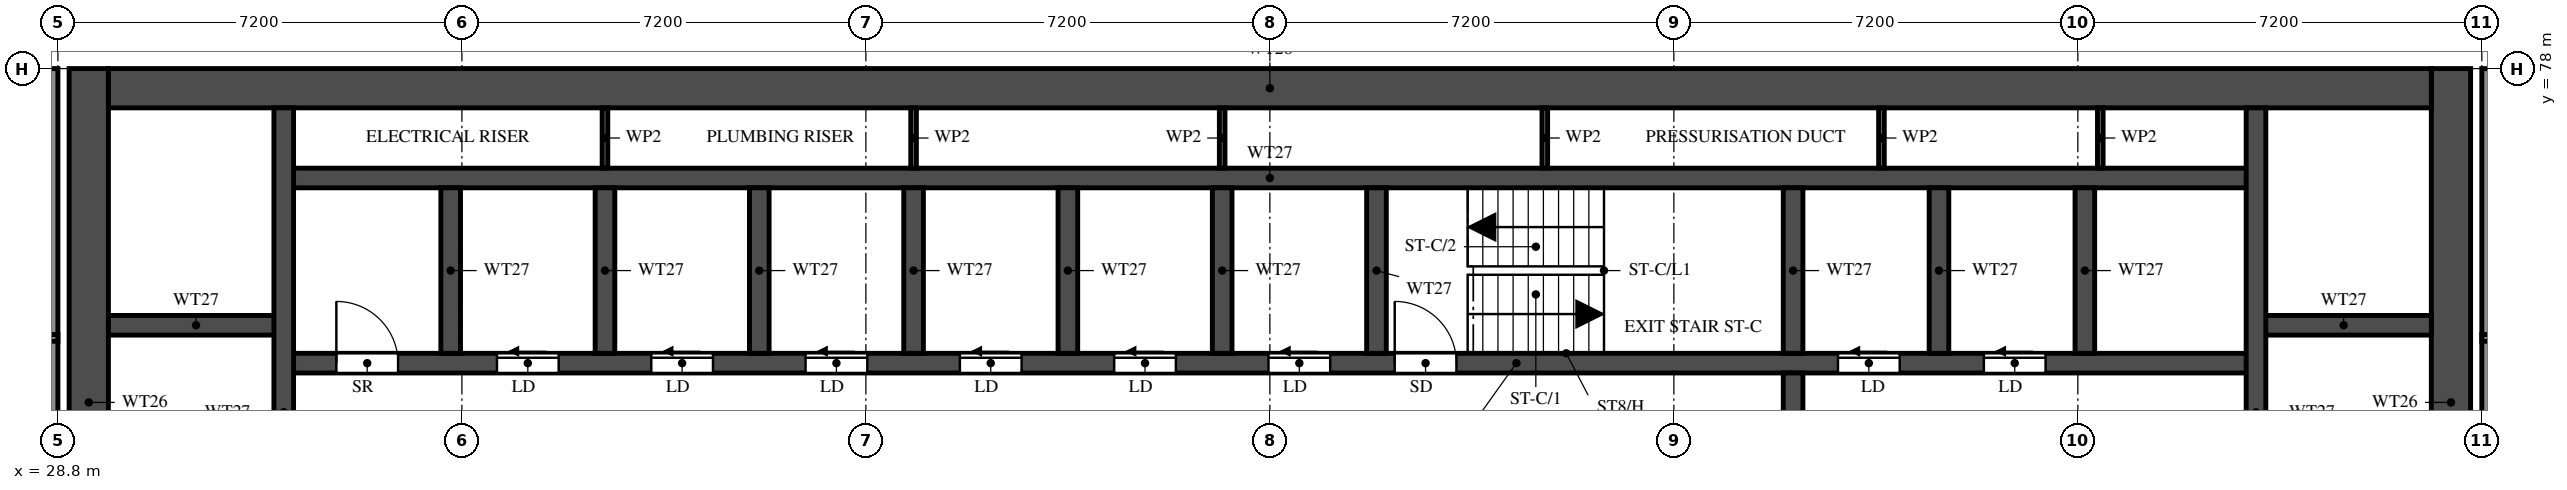
"""IFC4 building model, lengths in metres.
Left out: names, types, materials, properties, quantities, classifications, styles, units other than length and angle.
Written with IfcOpenShell. Run it as: python <this file> out.ifc"""

import sys

from ifc_helpers import new_model, si_unit, direction, frame, frame_2d, origin, place, context, subcontext, project, spatial, rectangle, extrude, element, fill, save


model = new_model("IFC4")
c1 = context("Model", 3, precision=1e-05, world=origin(), true_north=direction((0.0, 1.0)))
c2 = subcontext(c1, "Body", "Model", "MODEL_VIEW")
j1 = project(units=[si_unit("LENGTHUNIT", "METRE"), si_unit("PLANEANGLEUNIT", "RADIAN")], contexts=[c1])
p1 = place(None, origin())
s1 = spatial("IfcSite", under=j1, at=p1, CompositionType="ELEMENT")
p2 = place(p1, origin())
s2 = spatial("IfcBuilding", under=s1, at=p2, CompositionType="ELEMENT")
p3 = place(p2, frame((0.0, 0.0, 199.0)))
s3 = spatial("IfcBuildingStorey", under=s2, at=p3, CompositionType="ELEMENT", Elevation=199.0)
for number, where, z_axis, x_axis in (
    (1, (29.35, 66.1, 0.0), (0.0, 0.0, 1.0), (0.0, 1.0, 0.0)),
    (2, (71.45, 66.1, 0.0), (0.0, 0.0, 1.0), (0.0, 1.0, 0.0)),
):
    element("IfcWall", number, at=place(p3, frame(where, z_axis=z_axis, x_axis=x_axis)), inside=s3, PredefinedType="SHEAR", context=c2, shape_type="SweptSolid", body=[
        extrude(rectangle(XDim=11.9, YDim=0.7, at=frame_2d((5.95, 0.0))), origin(), (0.0, 0.0, 1.0), 3.2),
    ])
p4 = place(p3, frame((29.7, 77.65, 0.0), z_axis=(0.0, 0.0, 1.0), x_axis=(1.0, 0.0, 0.0)))
e3 = element("IfcWall", 3, at=p4, inside=s3, PredefinedType="SHEAR", context=c2, shape_type="SweptSolid", body=[
    extrude(rectangle(XDim=41.4, YDim=0.7, at=frame_2d((20.7, 0.0))), origin(), (0.0, 0.0, 1.0), 3.2),
])
p5 = place(p3, frame((32.825, 72.75, 0.0), z_axis=(0.0, 0.0, 1.0), x_axis=(1.0, 0.0, 0.0)))
e4 = element("IfcWall", 4, at=p5, inside=s3, PredefinedType="SHEAR", context=c2, shape_type="SweptSolid", body=[
    extrude(rectangle(XDim=35.15, YDim=0.35, at=frame_2d((17.575, 0.0))), origin(), (0.0, 0.0, 1.0), 3.2),
])
p6 = place(p5, frame((19.8, 0.0, 0.0)))
e5 = element("IfcOpeningElement", 5, at=p6, cuts=e4, PredefinedType="OPENING", context=c2, shape_type="SweptSolid", body=[
    extrude(rectangle(XDim=1.1, YDim=2.1, at=frame_2d((0.55, 1.05))), frame((0.0, 0.185, 0.0), z_axis=(0.0, -1.0, 0.0), x_axis=(1.0, 0.0, 0.0)), (0.0, 0.0, 1.0), 0.37),
])
p7 = place(p5, frame((27.7, 0.0, 0.0)))
e6 = element("IfcOpeningElement", 6, at=p7, cuts=e4, PredefinedType="OPENING", context=c2, shape_type="SweptSolid", body=[
    extrude(rectangle(XDim=1.1, YDim=2.1, at=frame_2d((0.55, 1.05))), frame((0.0, 0.185, 0.0), z_axis=(0.0, -1.0, 0.0), x_axis=(1.0, 0.0, 0.0)), (0.0, 0.0, 1.0), 0.37),
])
p8 = place(p5, frame((30.3, 0.0, 0.0)))
e7 = element("IfcOpeningElement", 7, at=p8, cuts=e4, PredefinedType="OPENING", context=c2, shape_type="SweptSolid", body=[
    extrude(rectangle(XDim=1.1, YDim=2.1, at=frame_2d((0.55, 1.05))), frame((0.0, 0.185, 0.0), z_axis=(0.0, -1.0, 0.0), x_axis=(1.0, 0.0, 0.0)), (0.0, 0.0, 1.0), 0.37),
])
p9 = place(p5, frame((3.8, 0.0, 0.0)))
e8 = element("IfcOpeningElement", 8, at=p9, cuts=e4, PredefinedType="OPENING", context=c2, shape_type="SweptSolid", body=[
    extrude(rectangle(XDim=1.1, YDim=2.1, at=frame_2d((0.55, 1.05))), frame((0.0, 0.185, 0.0), z_axis=(0.0, -1.0, 0.0), x_axis=(1.0, 0.0, 0.0)), (0.0, 0.0, 1.0), 0.37),
])
p10 = place(p5, frame((6.55, 0.0, 0.0)))
e9 = element("IfcOpeningElement", 9, at=p10, cuts=e4, PredefinedType="OPENING", context=c2, shape_type="SweptSolid", body=[
    extrude(rectangle(XDim=1.1, YDim=2.1, at=frame_2d((0.55, 1.05))), frame((0.0, 0.185, 0.0), z_axis=(0.0, -1.0, 0.0), x_axis=(1.0, 0.0, 0.0)), (0.0, 0.0, 1.0), 0.37),
])
p11 = place(p5, frame((9.3, 0.0, 0.0)))
e10 = element("IfcOpeningElement", 10, at=p11, cuts=e4, PredefinedType="OPENING", context=c2, shape_type="SweptSolid", body=[
    extrude(rectangle(XDim=1.1, YDim=2.1, at=frame_2d((0.55, 1.05))), frame((0.0, 0.185, 0.0), z_axis=(0.0, -1.0, 0.0), x_axis=(1.0, 0.0, 0.0)), (0.0, 0.0, 1.0), 0.37),
])
p12 = place(p5, frame((12.05, 0.0, 0.0)))
e11 = element("IfcOpeningElement", 11, at=p12, cuts=e4, PredefinedType="OPENING", context=c2, shape_type="SweptSolid", body=[
    extrude(rectangle(XDim=1.1, YDim=2.1, at=frame_2d((0.55, 1.05))), frame((0.0, 0.185, 0.0), z_axis=(0.0, -1.0, 0.0), x_axis=(1.0, 0.0, 0.0)), (0.0, 0.0, 1.0), 0.37),
])
p13 = place(p5, frame((14.8, 0.0, 0.0)))
e12 = element("IfcOpeningElement", 12, at=p13, cuts=e4, PredefinedType="OPENING", context=c2, shape_type="SweptSolid", body=[
    extrude(rectangle(XDim=1.1, YDim=2.1, at=frame_2d((0.55, 1.05))), frame((0.0, 0.185, 0.0), z_axis=(0.0, -1.0, 0.0), x_axis=(1.0, 0.0, 0.0)), (0.0, 0.0, 1.0), 0.37),
])
p14 = place(p5, frame((17.55, 0.0, 0.0)))
e13 = element("IfcOpeningElement", 13, at=p14, cuts=e4, PredefinedType="OPENING", context=c2, shape_type="SweptSolid", body=[
    extrude(rectangle(XDim=1.1, YDim=2.1, at=frame_2d((0.55, 1.05))), frame((0.0, 0.185, 0.0), z_axis=(0.0, -1.0, 0.0), x_axis=(1.0, 0.0, 0.0)), (0.0, 0.0, 1.0), 0.37),
])
p15 = place(p5, frame((0.938, 0.0, 0.0)))
e14 = element("IfcOpeningElement", 14, at=p15, cuts=e4, PredefinedType="OPENING", context=c2, shape_type="SweptSolid", body=[
    extrude(rectangle(XDim=1.1, YDim=2.1, at=frame_2d((0.55, 1.05))), frame((0.0, 0.185, 0.0), z_axis=(0.0, -1.0, 0.0), x_axis=(1.0, 0.0, 0.0)), (0.0, 0.0, 1.0), 0.37),
])
p16 = place(p3, frame((32.825, 76.05, 0.0), z_axis=(0.0, 0.0, 1.0), x_axis=(1.0, 0.0, 0.0)))
e15 = element("IfcWall", 15, at=p16, inside=s3, PredefinedType="SHEAR", context=c2, shape_type="SweptSolid", body=[
    extrude(rectangle(XDim=35.15, YDim=0.35, at=frame_2d((17.575, 0.0))), origin(), (0.0, 0.0, 1.0), 3.2),
])
for number, where, z_axis, x_axis in (
    (16, (29.7, 73.425, 0.0), (0.0, 0.0, 1.0), (1.0, 0.0, 0.0)),
    (17, (67.975, 73.425, 0.0), (0.0, 0.0, 1.0), (1.0, 0.0, 0.0)),
):
    element("IfcWall", number, at=place(p3, frame(where, z_axis=z_axis, x_axis=x_axis)), inside=s3, PredefinedType="SHEAR", context=c2, shape_type="SweptSolid", body=[
        extrude(rectangle(XDim=3.125, YDim=0.35, at=frame_2d((1.562, 0.0))), origin(), (0.0, 0.0, 1.0), 3.2),
    ])
p17 = place(p3, frame((32.825, 66.45, 0.0), z_axis=(0.0, 0.0, 1.0), x_axis=(0.0, 1.0, 0.0)))
e18 = element("IfcWall", 18, at=p17, inside=s3, PredefinedType="SHEAR", context=c2, shape_type="SweptSolid", body=[
    extrude(rectangle(XDim=10.85, YDim=0.35, at=frame_2d((5.425, 0.0))), origin(), (0.0, 0.0, 1.0), 3.2),
])
p18 = place(p3, frame((67.975, 66.45, 0.0), z_axis=(0.0, 0.0, 1.0), x_axis=(0.0, 1.0, 0.0)))
e19 = element("IfcWall", 19, at=p18, inside=s3, PredefinedType="SHEAR", context=c2, shape_type="SweptSolid", body=[
    extrude(rectangle(XDim=10.85, YDim=0.35, at=frame_2d((5.425, 0.0))), origin(), (0.0, 0.0, 1.0), 3.2),
])
p19 = place(p18, frame((0.15, 0.0, 0.0)))
e20 = element("IfcOpeningElement", 20, at=p19, cuts=e19, PredefinedType="OPENING", context=c2, shape_type="SweptSolid", body=[
    extrude(rectangle(XDim=1.1, YDim=2.1, at=frame_2d((0.55, 1.05))), frame((0.0, 0.185, 0.0), z_axis=(0.0, -1.0, 0.0), x_axis=(1.0, 0.0, 0.0)), (0.0, 0.0, 1.0), 0.37),
])
p20 = place(p3, frame((59.725, 66.45, 0.0), z_axis=(0.0, 0.0, 1.0), x_axis=(0.0, 1.0, 0.0)))
e21 = element("IfcWall", 21, at=p20, inside=s3, PredefinedType="SHEAR", context=c2, shape_type="SweptSolid", body=[
    extrude(rectangle(XDim=6.125, YDim=0.35, at=frame_2d((3.062, 0.0))), origin(), (0.0, 0.0, 1.0), 3.2),
])
p21 = place(p20, frame((3.85, 0.0, 0.0)))
e22 = element("IfcOpeningElement", 22, at=p21, cuts=e21, PredefinedType="OPENING", context=c2, shape_type="SweptSolid", body=[
    extrude(rectangle(XDim=1.2, YDim=2.1, at=frame_2d((0.6, 1.05))), frame((0.0, 0.185, 0.0), z_axis=(0.0, -1.0, 0.0), x_axis=(1.0, 0.0, 0.0)), (0.0, 0.0, 1.0), 0.37),
])
for number, where, z_axis, x_axis in (
    (23, (59.725, 72.925, 0.0), (0.0, 0.0, 1.0), (0.0, 1.0, 0.0)),
    (24, (35.8, 72.925, 0.0), (0.0, 0.0, 1.0), (0.0, 1.0, 0.0)),
    (25, (38.55, 72.925, 0.0), (0.0, 0.0, 1.0), (0.0, 1.0, 0.0)),
    (26, (41.3, 72.925, 0.0), (0.0, 0.0, 1.0), (0.0, 1.0, 0.0)),
    (27, (44.05, 72.925, 0.0), (0.0, 0.0, 1.0), (0.0, 1.0, 0.0)),
    (28, (46.8, 72.925, 0.0), (0.0, 0.0, 1.0), (0.0, 1.0, 0.0)),
    (29, (49.55, 72.925, 0.0), (0.0, 0.0, 1.0), (0.0, 1.0, 0.0)),
    (30, (52.3, 72.925, 0.0), (0.0, 0.0, 1.0), (0.0, 1.0, 0.0)),
    (31, (62.325, 72.925, 0.0), (0.0, 0.0, 1.0), (0.0, 1.0, 0.0)),
    (32, (64.925, 72.925, 0.0), (0.0, 0.0, 1.0), (0.0, 1.0, 0.0)),
):
    element("IfcWall", number, at=place(p3, frame(where, z_axis=z_axis, x_axis=x_axis)), inside=s3, PredefinedType="SHEAR", context=c2, shape_type="SweptSolid", body=[
        extrude(rectangle(XDim=2.95, YDim=0.35, at=frame_2d((1.475, 0.0))), origin(), (0.0, 0.0, 1.0), 3.2),
    ])
for number, where, z_axis, x_axis in (
    (33, (38.55, 76.225, 0.0), (0.0, 0.0, 1.0), (0.0, 1.0, 0.0)),
    (34, (44.05, 76.225, 0.0), (0.0, 0.0, 1.0), (0.0, 1.0, 0.0)),
    (35, (49.55, 76.225, 0.0), (0.0, 0.0, 1.0), (0.0, 1.0, 0.0)),
    (36, (55.3, 76.225, 0.0), (0.0, 0.0, 1.0), (0.0, 1.0, 0.0)),
    (37, (61.3, 76.225, 0.0), (0.0, 0.0, 1.0), (0.0, 1.0, 0.0)),
    (38, (65.2, 76.225, 0.0), (0.0, 0.0, 1.0), (0.0, 1.0, 0.0)),
):
    element("IfcWall", number, at=place(p3, frame(where, z_axis=z_axis, x_axis=x_axis)), inside=s3, PredefinedType="PARTITIONING", context=c2, shape_type="SweptSolid", body=[
        extrude(rectangle(XDim=1.075, YDim=0.1, at=frame_2d((0.538, 0.0))), origin(), (0.0, 0.0, 1.0), 3.2),
    ])
for number, where, z_axis, x_axis in (
    (39, (28.7, 62.4, 0.0), (0.0, 0.0, 1.0), (0.0, 1.0, 0.0)),
    (40, (72.1, 62.4, 0.0), (0.0, 0.0, 1.0), (0.0, 1.0, 0.0)),
):
    element("IfcWall", number, at=place(p3, frame(where, z_axis=z_axis, x_axis=x_axis)), inside=s3, PredefinedType="SOLIDWALL", context=c2, shape_type="SweptSolid", body=[
        extrude(rectangle(XDim=15.6, YDim=0.2, at=frame_2d((7.8, 0.0))), origin(), (0.0, 0.0, 1.0), 3.2),
    ])
p22 = place(p3, frame((14.525, 73.2, 0.0), z_axis=(0.0, 0.0, 1.0), x_axis=(1.0, 0.0, 0.0)))
e41 = element("IfcWall", 41, at=p22, inside=s3, PredefinedType="PARTITIONING", context=c2, shape_type="SweptSolid", body=[
    extrude(rectangle(XDim=14.275, YDim=0.12, at=frame_2d((7.138, 0.0))), origin(), (0.0, 0.0, 1.0), 2.3),
])
p23 = place(p22, frame((7.675, 0.0, 0.0)))
e42 = element("IfcOpeningElement", 42, at=p23, cuts=e41, PredefinedType="OPENING", context=c2, shape_type="SweptSolid", body=[
    extrude(rectangle(XDim=0.9, YDim=2.1, at=frame_2d((0.45, 1.05))), frame((0.0, 0.07, 0.0), z_axis=(0.0, -1.0, 0.0), x_axis=(1.0, 0.0, 0.0)), (0.0, 0.0, 1.0), 0.14),
])
p24 = place(p3, frame((72.0, 73.2, 0.0), z_axis=(0.0, 0.0, 1.0), x_axis=(1.0, 0.0, 0.0)))
e43 = element("IfcWall", 43, at=p24, inside=s3, PredefinedType="PARTITIONING", context=c2, shape_type="SweptSolid", body=[
    extrude(rectangle(XDim=14.275, YDim=0.12, at=frame_2d((7.137, 0.0))), origin(), (0.0, 0.0, 1.0), 2.3),
])
p25 = place(p24, frame((5.7, 0.0, 0.0)))
e44 = element("IfcOpeningElement", 44, at=p25, cuts=e43, PredefinedType="OPENING", context=c2, shape_type="SweptSolid", body=[
    extrude(rectangle(XDim=0.9, YDim=2.1, at=frame_2d((0.45, 1.05))), frame((0.0, 0.07, 0.0), z_axis=(0.0, -1.0, 0.0), x_axis=(1.0, 0.0, 0.0)), (0.0, 0.0, 1.0), 0.14),
])
p26 = place(p6, origin())
e45 = element("IfcDoor", 45, at=p26, inside=s3, OperationType="SINGLE_SWING_LEFT", PredefinedType="DOOR", context=c2, shape_type="SweptSolid", body=[
    extrude(rectangle(XDim=1.1, YDim=2.1, at=frame_2d((0.55, 1.05))), frame((0.0, 0.025, 0.0), z_axis=(0.0, -1.0, 0.0), x_axis=(1.0, 0.0, 0.0)), (0.0, 0.0, 1.0), 0.05),
])
fill(e5, e45)
p27 = place(p7, origin())
e46 = element("IfcDoor", 46, at=p27, inside=s3, OperationType="SLIDING_TO_LEFT", PredefinedType="DOOR", context=c2, shape_type="SweptSolid", body=[
    extrude(rectangle(XDim=1.1, YDim=2.1, at=frame_2d((0.55, 1.05))), frame((0.0, 0.025, 0.0), z_axis=(0.0, -1.0, 0.0), x_axis=(1.0, 0.0, 0.0)), (0.0, 0.0, 1.0), 0.05),
])
fill(e6, e46)
p28 = place(p8, origin())
e47 = element("IfcDoor", 47, at=p28, inside=s3, OperationType="SLIDING_TO_LEFT", PredefinedType="DOOR", context=c2, shape_type="SweptSolid", body=[
    extrude(rectangle(XDim=1.1, YDim=2.1, at=frame_2d((0.55, 1.05))), frame((0.0, 0.025, 0.0), z_axis=(0.0, -1.0, 0.0), x_axis=(1.0, 0.0, 0.0)), (0.0, 0.0, 1.0), 0.05),
])
fill(e7, e47)
p29 = place(p9, origin())
e48 = element("IfcDoor", 48, at=p29, inside=s3, OperationType="SLIDING_TO_LEFT", PredefinedType="DOOR", context=c2, shape_type="SweptSolid", body=[
    extrude(rectangle(XDim=1.1, YDim=2.1, at=frame_2d((0.55, 1.05))), frame((0.0, 0.025, 0.0), z_axis=(0.0, -1.0, 0.0), x_axis=(1.0, 0.0, 0.0)), (0.0, 0.0, 1.0), 0.05),
])
fill(e8, e48)
p30 = place(p10, origin())
e49 = element("IfcDoor", 49, at=p30, inside=s3, OperationType="SLIDING_TO_LEFT", PredefinedType="DOOR", context=c2, shape_type="SweptSolid", body=[
    extrude(rectangle(XDim=1.1, YDim=2.1, at=frame_2d((0.55, 1.05))), frame((0.0, 0.025, 0.0), z_axis=(0.0, -1.0, 0.0), x_axis=(1.0, 0.0, 0.0)), (0.0, 0.0, 1.0), 0.05),
])
fill(e9, e49)
p31 = place(p11, origin())
e50 = element("IfcDoor", 50, at=p31, inside=s3, OperationType="SLIDING_TO_LEFT", PredefinedType="DOOR", context=c2, shape_type="SweptSolid", body=[
    extrude(rectangle(XDim=1.1, YDim=2.1, at=frame_2d((0.55, 1.05))), frame((0.0, 0.025, 0.0), z_axis=(0.0, -1.0, 0.0), x_axis=(1.0, 0.0, 0.0)), (0.0, 0.0, 1.0), 0.05),
])
fill(e10, e50)
p32 = place(p12, origin())
e51 = element("IfcDoor", 51, at=p32, inside=s3, OperationType="SLIDING_TO_LEFT", PredefinedType="DOOR", context=c2, shape_type="SweptSolid", body=[
    extrude(rectangle(XDim=1.1, YDim=2.1, at=frame_2d((0.55, 1.05))), frame((0.0, 0.025, 0.0), z_axis=(0.0, -1.0, 0.0), x_axis=(1.0, 0.0, 0.0)), (0.0, 0.0, 1.0), 0.05),
])
fill(e11, e51)
p33 = place(p13, origin())
e52 = element("IfcDoor", 52, at=p33, inside=s3, OperationType="SLIDING_TO_LEFT", PredefinedType="DOOR", context=c2, shape_type="SweptSolid", body=[
    extrude(rectangle(XDim=1.1, YDim=2.1, at=frame_2d((0.55, 1.05))), frame((0.0, 0.025, 0.0), z_axis=(0.0, -1.0, 0.0), x_axis=(1.0, 0.0, 0.0)), (0.0, 0.0, 1.0), 0.05),
])
fill(e12, e52)
p34 = place(p14, origin())
e53 = element("IfcDoor", 53, at=p34, inside=s3, OperationType="SLIDING_TO_LEFT", PredefinedType="DOOR", context=c2, shape_type="SweptSolid", body=[
    extrude(rectangle(XDim=1.1, YDim=2.1, at=frame_2d((0.55, 1.05))), frame((0.0, 0.025, 0.0), z_axis=(0.0, -1.0, 0.0), x_axis=(1.0, 0.0, 0.0)), (0.0, 0.0, 1.0), 0.05),
])
fill(e13, e53)
p35 = place(p15, origin())
e54 = element("IfcDoor", 54, at=p35, inside=s3, OperationType="SINGLE_SWING_LEFT", PredefinedType="DOOR", context=c2, shape_type="SweptSolid", body=[
    extrude(rectangle(XDim=1.1, YDim=2.1, at=frame_2d((0.55, 1.05))), frame((0.0, 0.025, 0.0), z_axis=(0.0, -1.0, 0.0), x_axis=(1.0, 0.0, 0.0)), (0.0, 0.0, 1.0), 0.05),
])
fill(e14, e54)
save(model, sys.argv[1])
